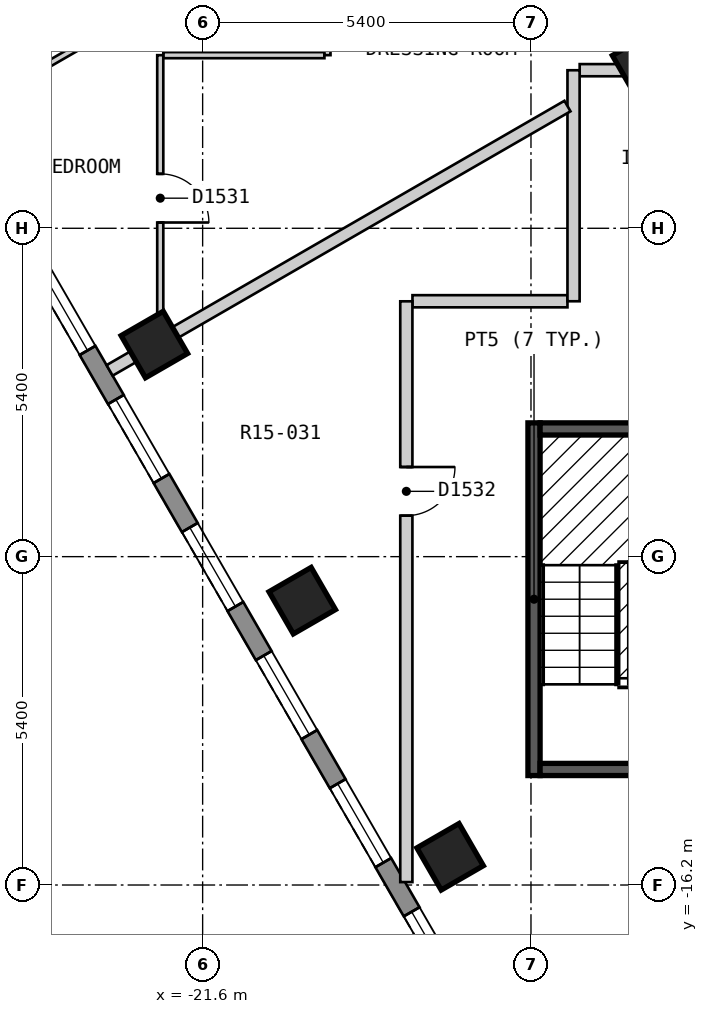
"""IFC4 building model, lengths in metres.
Left out: names, types, materials, properties, quantities, classifications, styles, units other than length and angle.
Written with IfcOpenShell. Run it as: python <this file> out.ifc"""

import sys

from ifc_helpers import new_model, si_unit, direction, frame, frame_2d, origin, origin_2d, place, context, subcontext, project, spatial, polyline, rectangle, outline, extrude, element, fill, save


model = new_model("IFC4")
c1 = context("Model", 3, precision=1e-05, world=origin(), true_north=direction((0.0, 1.0)))
c2 = subcontext(c1, "Body", "Model", "MODEL_VIEW")
j1 = project(units=[si_unit("LENGTHUNIT", "METRE"), si_unit("PLANEANGLEUNIT", "RADIAN")], contexts=[c1])
p1 = place(None, origin())
s1 = spatial("IfcSite", under=j1, at=p1, CompositionType="ELEMENT")
p2 = place(p1, origin())
s2 = spatial("IfcBuilding", under=s1, at=p2, CompositionType="ELEMENT")
p3 = place(p2, frame((0.0, 0.0, 196.2)))
s3 = spatial("IfcBuildingStorey", under=s2, at=p3, CompositionType="ELEMENT", Elevation=196.2)
for number, where, z_axis, x_axis in (
    (1, (-22.394, -7.312, 0.0), (0.0, 0.0, 1.0), (0.5, -0.866, 0.0)),
    (2, (-19.962, -11.524, 0.0), (0.0, 0.0, 1.0), (0.5, -0.866, 0.0)),
    (3, (-17.53, -15.736, 0.0), (0.0, 0.0, 1.0), (0.5, -0.866, 0.0)),
):
    element("IfcColumn", number, at=place(p3, frame(where, z_axis=z_axis, x_axis=x_axis)), inside=s3, PredefinedType="COLUMN", context=c2, shape_type="SweptSolid", body=[
        extrude(rectangle(XDim=0.8, YDim=0.8, at=origin_2d()), origin(), (0.0, 0.0, 1.0), 3.0),
    ])
p4 = place(p3, frame((-14.383, -2.687, 0.0), z_axis=(0.0, 0.0, 1.0), x_axis=(0.5, -0.866025403784, 0.0)))
e4 = element("IfcColumn", 4, at=p4, inside=s3, PredefinedType="COLUMN", context=c2, shape_type="SweptSolid", body=[
    extrude(rectangle(XDim=0.7, YDim=0.7, at=origin_2d()), origin(), (0.0, 0.0, 1.0), 3.0),
])
p5 = place(p3, frame((-26.024, -3.025, 0.0), z_axis=(0.0, 0.0, 1.0), x_axis=(0.500018670445, -0.86601462413, 0.0)))
e5 = element("IfcWall", 5, at=p5, inside=s3, PredefinedType="SOLIDWALL", context=c2, shape_type="SweptSolid", body=[
    extrude(outline(polyline([(0.0, -0.15), (20.785, -0.15), (20.705, 0.15), (0.08, 0.15), (0.0, -0.15)])), origin(), (0.0, 0.0, 1.0), 2.6),
])
p6 = place(p5, frame((1.13, 0.0, 0.15)))
e6 = element("IfcOpeningElement", 6, at=p6, cuts=e5, PredefinedType="OPENING", context=c2, shape_type="SweptSolid", body=[
    extrude(rectangle(XDim=1.5, YDim=2.1, at=frame_2d((0.75, 1.05))), frame((0.0, 0.16, 0.0), z_axis=(0.0, -1.0, 0.0), x_axis=(1.0, 0.0, 0.0)), (0.0, 0.0, 1.0), 0.32),
])
p7 = place(p5, frame((3.562, 0.0, 0.15)))
e7 = element("IfcOpeningElement", 7, at=p7, cuts=e5, PredefinedType="OPENING", context=c2, shape_type="SweptSolid", body=[
    extrude(rectangle(XDim=1.5, YDim=2.1, at=frame_2d((0.75, 1.05))), frame((0.0, 0.16, 0.0), z_axis=(0.0, -1.0, 0.0), x_axis=(1.0, 0.0, 0.0)), (0.0, 0.0, 1.0), 0.32),
])
p8 = place(p5, frame((5.994, 0.0, 0.15)))
e8 = element("IfcOpeningElement", 8, at=p8, cuts=e5, PredefinedType="OPENING", context=c2, shape_type="SweptSolid", body=[
    extrude(rectangle(XDim=1.5, YDim=2.1, at=frame_2d((0.75, 1.05))), frame((0.0, 0.16, 0.0), z_axis=(0.0, -1.0, 0.0), x_axis=(1.0, 0.0, 0.0)), (0.0, 0.0, 1.0), 0.32),
])
p9 = place(p5, frame((8.425, 0.0, 0.15)))
e9 = element("IfcOpeningElement", 9, at=p9, cuts=e5, PredefinedType="OPENING", context=c2, shape_type="SweptSolid", body=[
    extrude(rectangle(XDim=1.5, YDim=2.1, at=frame_2d((0.75, 1.05))), frame((0.0, 0.16, 0.0), z_axis=(0.0, -1.0, 0.0), x_axis=(1.0, 0.0, 0.0)), (0.0, 0.0, 1.0), 0.32),
])
p10 = place(p5, frame((10.857, 0.0, 0.15)))
e10 = element("IfcOpeningElement", 10, at=p10, cuts=e5, PredefinedType="OPENING", context=c2, shape_type="SweptSolid", body=[
    extrude(rectangle(XDim=1.5, YDim=2.1, at=frame_2d((0.75, 1.05))), frame((0.0, 0.16, 0.0), z_axis=(0.0, -1.0, 0.0), x_axis=(1.0, 0.0, 0.0)), (0.0, 0.0, 1.0), 0.32),
])
p11 = place(p5, frame((13.289, 0.0, 0.15)))
e11 = element("IfcOpeningElement", 11, at=p11, cuts=e5, PredefinedType="OPENING", context=c2, shape_type="SweptSolid", body=[
    extrude(rectangle(XDim=1.5, YDim=2.1, at=frame_2d((0.75, 1.05))), frame((0.0, 0.16, 0.0), z_axis=(0.0, -1.0, 0.0), x_axis=(1.0, 0.0, 0.0)), (0.0, 0.0, 1.0), 0.32),
])
p12 = place(p5, frame((15.722, 0.0, 0.15)))
e12 = element("IfcOpeningElement", 12, at=p12, cuts=e5, PredefinedType="OPENING", context=c2, shape_type="SweptSolid", body=[
    extrude(rectangle(XDim=1.5, YDim=2.1, at=frame_2d((0.75, 1.05))), frame((0.0, 0.16, 0.0), z_axis=(0.0, -1.0, 0.0), x_axis=(1.0, 0.0, 0.0)), (0.0, 0.0, 1.0), 0.32),
])
p13 = place(p5, frame((18.154, 0.0, 0.15)))
e13 = element("IfcOpeningElement", 13, at=p13, cuts=e5, PredefinedType="OPENING", context=c2, shape_type="SweptSolid", body=[
    extrude(rectangle(XDim=1.5, YDim=2.1, at=frame_2d((0.75, 1.05))), frame((0.0, 0.16, 0.0), z_axis=(0.0, -1.0, 0.0), x_axis=(1.0, 0.0, 0.0)), (0.0, 0.0, 1.0), 0.32),
])
p14 = place(p3, frame((-15.53, -0.701, 0.0), z_axis=(0.0, 0.0, 1.0), x_axis=(0.499972710878, -0.866041158593, 0.0)))
e14 = element("IfcWall", 14, at=p14, inside=s3, PredefinedType="PARTITIONING", context=c2, shape_type="SweptSolid", body=[
    extrude(rectangle(XDim=2.308, YDim=0.2, at=frame_2d((1.154, 0.0))), origin(), (0.0, 0.0, 1.0), 2.6),
])
p15 = place(p3, frame((-18.149, -6.6, 0.0), z_axis=(0.0, 0.0, 1.0), x_axis=(1.0, 0.0, 0.0)))
e15 = element("IfcWall", 15, at=p15, inside=s3, PredefinedType="PARTITIONING", context=c2, shape_type="SweptSolid", body=[
    extrude(rectangle(XDim=2.549, YDim=0.2, at=frame_2d((1.274, 0.0))), origin(), (0.0, 0.0, 1.0), 2.6),
])
p16 = place(p3, frame((-15.399, -2.8, 0.0), z_axis=(0.0, 0.0, 1.0), x_axis=(1.0, 0.0, 0.0)))
e16 = element("IfcWall", 16, at=p16, inside=s3, PredefinedType="PARTITIONING", context=c2, shape_type="SweptSolid", body=[
    extrude(rectangle(XDim=1.081, YDim=0.2, at=frame_2d((0.541, 0.0))), origin(), (0.0, 0.0, 1.0), 2.6),
])
p17 = place(p3, frame((-15.5, -6.6, 0.0), z_axis=(0.0, 0.0, 1.0), x_axis=(0.0, 1.0, 0.0)))
e17 = element("IfcWall", 17, at=p17, inside=s3, PredefinedType="PARTITIONING", context=c2, shape_type="SweptSolid", body=[
    extrude(rectangle(XDim=3.799, YDim=0.2, at=frame_2d((1.899, 0.0))), origin(), (0.0, 0.0, 1.0), 2.6),
])
p18 = place(p3, frame((-18.25, -16.152, 0.0), z_axis=(0.0, 0.0, 1.0), x_axis=(0.0, 1.0, 0.0)))
e18 = element("IfcWall", 18, at=p18, inside=s3, PredefinedType="PARTITIONING", context=c2, shape_type="SweptSolid", body=[
    extrude(rectangle(XDim=9.551, YDim=0.2, at=frame_2d((4.775, 0.0))), origin(), (0.0, 0.0, 1.0), 2.6),
])
p19 = place(p18, frame((6.026, 0.0, 0.0)))
e19 = element("IfcOpeningElement", 19, at=p19, cuts=e18, PredefinedType="OPENING", context=c2, shape_type="SweptSolid", body=[
    extrude(rectangle(XDim=0.8, YDim=2.1, at=frame_2d((0.4, 1.05))), frame((0.0, 0.11, 0.0), z_axis=(0.0, -1.0, 0.0), x_axis=(1.0, 0.0, 0.0)), (0.0, 0.0, 1.0), 0.22),
])
p20 = place(p3, frame((-22.247, -2.553, 0.0), z_axis=(0.0, 0.0, 1.0), x_axis=(1.0, 0.0, 0.0)))
e20 = element("IfcWall", 20, at=p20, inside=s3, PredefinedType="PARTITIONING", context=c2, shape_type="SweptSolid", body=[
    extrude(rectangle(XDim=2.65, YDim=0.1, at=frame_2d((1.325, 0.0))), origin(), (0.0, 0.0, 1.0), 2.6),
])
p21 = place(p3, frame((-19.547, -2.553, 0.0), z_axis=(0.0, 0.0, 1.0), x_axis=(0.0, 1.0, 0.0)))
e21 = element("IfcWall", 21, at=p21, inside=s3, PredefinedType="PARTITIONING", context=c2, shape_type="SweptSolid", body=[
    extrude(rectangle(XDim=0.715, YDim=0.1, at=frame_2d((0.357, 0.0))), origin(), (0.0, 0.0, 1.0), 2.6),
])
p22 = place(p3, frame((-22.297, -7.141, 0.0), z_axis=(0.0, 0.0, 1.0), x_axis=(0.0, 1.0, 0.0)))
e22 = element("IfcWall", 22, at=p22, inside=s3, PredefinedType="PARTITIONING", context=c2, shape_type="SweptSolid", body=[
    extrude(rectangle(XDim=4.588, YDim=0.1, at=frame_2d((2.294, 0.0))), origin(), (0.0, 0.0, 1.0), 2.6),
])
p23 = place(p22, frame((1.836, 0.0, 0.0)))
e23 = element("IfcOpeningElement", 23, at=p23, cuts=e22, PredefinedType="OPENING", context=c2, shape_type="SweptSolid", body=[
    extrude(rectangle(XDim=0.8, YDim=2.1, at=frame_2d((0.4, 1.05))), frame((0.0, 0.06, 0.0), z_axis=(0.0, -1.0, 0.0), x_axis=(1.0, 0.0, 0.0)), (0.0, 0.0, 1.0), 0.12),
])
p24 = place(p3, frame((-25.563, -3.524, 0.0), z_axis=(0.0, 0.0, 1.0), x_axis=(0.866128586522, 0.499821239653, 0.0)))
e24 = element("IfcWall", 24, at=p24, inside=s3, PredefinedType="PARTITIONING", context=c2, shape_type="SweptSolid", body=[
    extrude(rectangle(XDim=5.848, YDim=0.1, at=frame_2d((2.924, 0.0))), origin(), (0.0, 0.0, 1.0), 2.6),
])
p25 = place(p24, frame((2.474, 0.0, 0.0)))
e25 = element("IfcOpeningElement", 25, at=p25, cuts=e24, PredefinedType="OPENING", context=c2, shape_type="SweptSolid", body=[
    extrude(rectangle(XDim=0.9, YDim=2.1, at=frame_2d((0.45, 1.05))), frame((0.0, 0.06, 0.0), z_axis=(0.0, -1.0, 0.0), x_axis=(1.0, 0.0, 0.0)), (0.0, 0.0, 1.0), 0.12),
])
p26 = place(p3, frame((-23.13, -7.737, 0.0), z_axis=(0.0, 0.0, 1.0), x_axis=(0.866033148899, 0.499986584829, 0.0)))
e26 = element("IfcWall", 26, at=p26, inside=s3, PredefinedType="PARTITIONING", context=c2, shape_type="SweptSolid", body=[
    extrude(rectangle(XDim=8.695, YDim=0.2, at=frame_2d((4.347, 0.0))), origin(), (0.0, 0.0, 1.0), 2.6),
])
p27 = place(p3, frame((-16.15, -14.4, 0.0), z_axis=(0.0, 0.0, 1.0), x_axis=(0.0, 1.0, 0.0)))
e27 = element("IfcWall", 27, at=p27, inside=s3, PredefinedType="SOLIDWALL", context=c2, shape_type="SweptSolid", body=[
    extrude(rectangle(XDim=5.8, YDim=0.2, at=frame_2d((2.9, 0.0))), origin(), (0.0, 0.0, 1.0), 2.6),
])
for number, where, z_axis, x_axis in (
    (28, (-16.05, -14.3, 0.0), (0.0, 0.0, 1.0), (1.0, 0.0, 0.0)),
    (29, (-16.05, -8.7, 0.0), (0.0, 0.0, 1.0), (1.0, 0.0, 0.0)),
):
    element("IfcWall", number, at=place(p3, frame(where, z_axis=z_axis, x_axis=x_axis)), inside=s3, PredefinedType="SOLIDWALL", context=c2, shape_type="SweptSolid", body=[
        extrude(rectangle(XDim=2.75, YDim=0.2, at=frame_2d((1.375, 0.0))), origin(), (0.0, 0.0, 1.0), 2.6),
    ])
p28 = place(p7, origin())
e30 = element("IfcWindow", 30, at=p28, inside=s3, PartitioningType="SINGLE_PANEL", PredefinedType="WINDOW", context=c2, shape_type="SweptSolid", body=[
    extrude(rectangle(XDim=1.5, YDim=2.1, at=frame_2d((0.75, 1.05))), frame((0.0, 0.03, 0.0), z_axis=(0.0, -1.0, 0.0), x_axis=(1.0, 0.0, 0.0)), (0.0, 0.0, 1.0), 0.06),
])
fill(e7, e30)
p29 = place(p8, origin())
e31 = element("IfcWindow", 31, at=p29, inside=s3, PartitioningType="SINGLE_PANEL", PredefinedType="WINDOW", context=c2, shape_type="SweptSolid", body=[
    extrude(rectangle(XDim=1.5, YDim=2.1, at=frame_2d((0.75, 1.05))), frame((0.0, 0.03, 0.0), z_axis=(0.0, -1.0, 0.0), x_axis=(1.0, 0.0, 0.0)), (0.0, 0.0, 1.0), 0.06),
])
fill(e8, e31)
p30 = place(p9, origin())
e32 = element("IfcWindow", 32, at=p30, inside=s3, PartitioningType="SINGLE_PANEL", PredefinedType="WINDOW", context=c2, shape_type="SweptSolid", body=[
    extrude(rectangle(XDim=1.5, YDim=2.1, at=frame_2d((0.75, 1.05))), frame((0.0, 0.03, 0.0), z_axis=(0.0, -1.0, 0.0), x_axis=(1.0, 0.0, 0.0)), (0.0, 0.0, 1.0), 0.06),
])
fill(e9, e32)
p31 = place(p10, origin())
e33 = element("IfcWindow", 33, at=p31, inside=s3, PartitioningType="SINGLE_PANEL", PredefinedType="WINDOW", context=c2, shape_type="SweptSolid", body=[
    extrude(rectangle(XDim=1.5, YDim=2.1, at=frame_2d((0.75, 1.05))), frame((0.0, 0.03, 0.0), z_axis=(0.0, -1.0, 0.0), x_axis=(1.0, 0.0, 0.0)), (0.0, 0.0, 1.0), 0.06),
])
fill(e10, e33)
p32 = place(p11, origin())
e34 = element("IfcWindow", 34, at=p32, inside=s3, PartitioningType="SINGLE_PANEL", PredefinedType="WINDOW", context=c2, shape_type="SweptSolid", body=[
    extrude(rectangle(XDim=1.5, YDim=2.1, at=frame_2d((0.75, 1.05))), frame((0.0, 0.03, 0.0), z_axis=(0.0, -1.0, 0.0), x_axis=(1.0, 0.0, 0.0)), (0.0, 0.0, 1.0), 0.06),
])
fill(e11, e34)
p33 = place(p12, origin())
e35 = element("IfcWindow", 35, at=p33, inside=s3, PartitioningType="SINGLE_PANEL", PredefinedType="WINDOW", context=c2, shape_type="SweptSolid", body=[
    extrude(rectangle(XDim=1.5, YDim=2.1, at=frame_2d((0.75, 1.05))), frame((0.0, 0.03, 0.0), z_axis=(0.0, -1.0, 0.0), x_axis=(1.0, 0.0, 0.0)), (0.0, 0.0, 1.0), 0.06),
])
fill(e12, e35)
p34 = place(p23, origin())
e36 = element("IfcDoor", 36, at=p34, inside=s3, OperationType="SINGLE_SWING_LEFT", PredefinedType="DOOR", context=c2, shape_type="SweptSolid", body=[
    extrude(rectangle(XDim=0.8, YDim=2.1, at=frame_2d((0.4, 1.05))), frame((0.0, 0.025, 0.0), z_axis=(0.0, -1.0, 0.0), x_axis=(1.0, 0.0, 0.0)), (0.0, 0.0, 1.0), 0.05),
])
fill(e23, e36)
p35 = place(p19, origin())
e37 = element("IfcDoor", 37, at=p35, inside=s3, OperationType="SINGLE_SWING_RIGHT", PredefinedType="DOOR", context=c2, shape_type="SweptSolid", body=[
    extrude(rectangle(XDim=0.8, YDim=2.1, at=frame_2d((0.4, 1.05))), frame((0.0, 0.025, 0.0), z_axis=(0.0, -1.0, 0.0), x_axis=(1.0, 0.0, 0.0)), (0.0, 0.0, 1.0), 0.05),
])
fill(e19, e37)
save(model, sys.argv[1])
